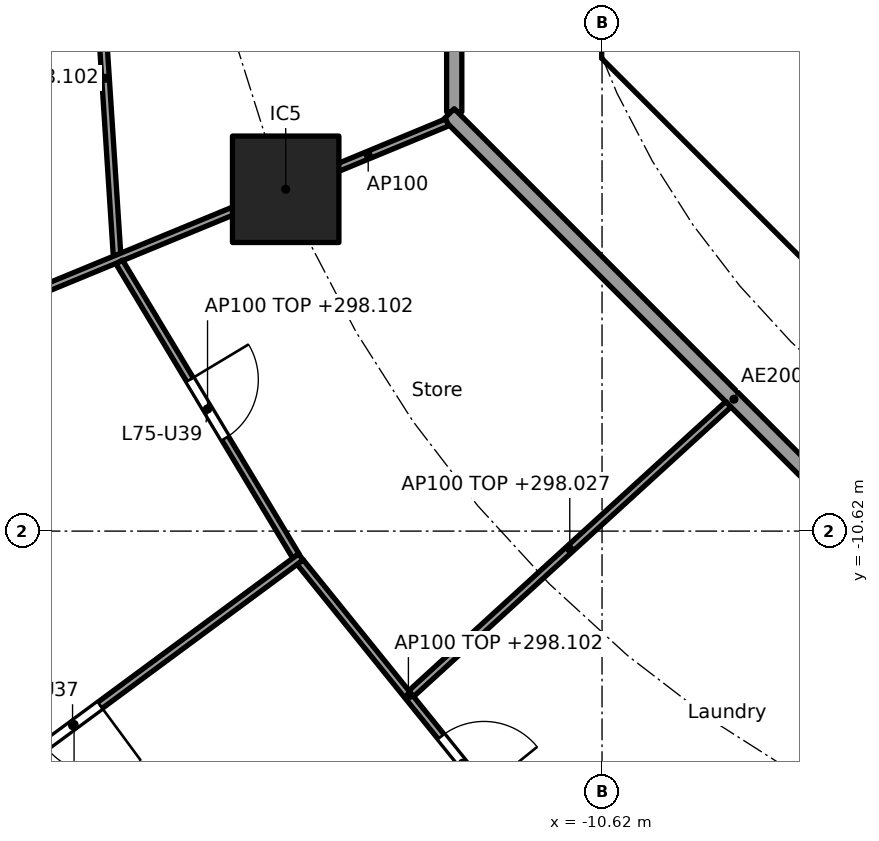
"""IFC4 building model, lengths in metres.
Left out: names, types, materials, properties, quantities, classifications, styles, units other than length and angle.
Written with IfcOpenShell. Run it as: python <this file> out.ifc"""

import sys

from ifc_helpers import new_model, si_unit, direction, frame, frame_2d, origin, origin_2d, place, context, subcontext, project, spatial, polyline, rectangle, outline, extrude, element, fill, save


model = new_model("IFC4")
c1 = context("Model", 3, precision=1e-05, world=origin(), true_north=direction((0.0, 1.0)))
c2 = subcontext(c1, "Body", "Model", "MODEL_VIEW")
j1 = project(units=[si_unit("LENGTHUNIT", "METRE"), si_unit("PLANEANGLEUNIT", "RADIAN")], contexts=[c1])
p1 = place(None, origin())
s1 = spatial("IfcSite", under=j1, at=p1, CompositionType="ELEMENT")
p2 = place(p1, origin())
s2 = spatial("IfcBuilding", under=s1, at=p2, CompositionType="ELEMENT")
p3 = place(p2, frame((0.0, 0.0, 295.5)))
s3 = spatial("IfcBuildingStorey", under=s2, at=p3, CompositionType="ELEMENT", Elevation=295.5)
p4 = place(p3, frame((-14.782, -6.123, 0.0), z_axis=(0.0, 0.0, 1.0), x_axis=(1.0, 0.0, 0.0)))
e1 = element("IfcColumn", 1, at=p4, inside=s3, PredefinedType="COLUMN", context=c2, shape_type="SweptSolid", body=[
    extrude(rectangle(XDim=1.4, YDim=1.4, at=origin_2d()), origin(), (0.0, 0.0, 1.0), 3.7),
])
p5 = place(p3, frame((-9.988, -4.613, 0.0), z_axis=(0.0, 0.0, 1.0), x_axis=(0.707106781187, -0.707106781187, 0.0)))
e2 = element("IfcWall", 2, at=p5, inside=s3, PredefinedType="SHEAR", context=c2, shape_type="SweptSolid", body=[
    extrude(rectangle(XDim=7.602, YDim=0.6, at=frame_2d((3.801, 0.0))), origin(), (0.0, 0.0, 1.0), 3.28),
])
p6 = place(p5, frame((6.151, 0.0, 0.0)))
e3 = element("IfcOpeningElement", 3, at=p6, cuts=e2, PredefinedType="OPENING", context=c2, shape_type="SweptSolid", body=[
    extrude(rectangle(XDim=1.1, YDim=2.1, at=frame_2d((0.55, 1.05))), frame((0.0, 0.31, 0.0), z_axis=(0.0, -1.0, 0.0), x_axis=(1.0, 0.0, 0.0)), (0.0, 0.0, 1.0), 0.62),
])
p7 = place(p3, origin())
e4 = element("IfcWall", 4, at=p7, inside=s3, PredefinedType="SHEAR", context=c2, shape_type="SweptSolid", body=[
    extrude(outline(polyline([(-10.625, -3.801), (-10.025, -3.801), (-10.025, -4.152), (-9.776, -4.401), (-10.2, -4.825), (-10.625, -4.401), (-10.625, -3.801)])), origin(), (0.0, 0.0, 1.0), 3.28),
])
p8 = place(p3, frame((-12.565, 5.304, 0.0), z_axis=(0.0, 0.0, 1.0), x_axis=(0.0, -1.0, 0.0)))
e5 = element("IfcWall", 5, at=p8, inside=s3, PredefinedType="PARTITIONING", context=c2, shape_type="SweptSolid", body=[
    extrude(rectangle(XDim=10.409, YDim=0.2, at=frame_2d((5.205, 0.0))), origin(), (0.0, 0.0, 1.0), 3.28),
])
p9 = place(p8, frame((4.804, 0.0, 0.0)))
e6 = element("IfcOpeningElement", 6, at=p9, cuts=e5, PredefinedType="OPENING", context=c2, shape_type="SweptSolid", body=[
    extrude(rectangle(XDim=1.0, YDim=2.1, at=frame_2d((0.5, 1.05))), frame((0.0, 0.11, 0.0), z_axis=(0.0, -1.0, 0.0), x_axis=(1.0, 0.0, 0.0)), (0.0, 0.0, 1.0), 0.22),
])
p10 = place(p3, frame((-12.635, -5.134, 0.0), z_axis=(0.0, 0.0, 1.0), x_axis=(0.707106781187, -0.707106781187, 0.0)))
e7 = element("IfcWall", 7, at=p10, inside=s3, PredefinedType="PARTITIONING", context=c2, shape_type="SweptSolid", body=[
    extrude(rectangle(XDim=10.609, YDim=0.2, at=frame_2d((5.305, 0.0))), origin(), (0.0, 0.0, 1.0), 3.28),
])
p11 = place(p3, frame((-17.304, -2.338, 0.0), z_axis=(0.0, 0.0, 1.0), x_axis=(0.064981578354, -0.99788646372, 0.0)))
e8 = element("IfcWall", 8, at=p11, inside=s3, PredefinedType="PARTITIONING", context=c2, shape_type="SweptSolid", body=[
    extrude(rectangle(XDim=4.659, YDim=0.1, at=frame_2d((2.329, 0.0))), origin(), (0.0, 0.0, 1.0), 2.602),
])
p12 = place(p3, frame((-12.657, -5.243, 0.0), z_axis=(0.0, 0.0, 1.0), x_axis=(-0.923871314276, -0.382703272338, 0.0)))
e9 = element("IfcWall", 9, at=p12, inside=s3, PredefinedType="PARTITIONING", context=c2, shape_type="SweptSolid", body=[
    extrude(rectangle(XDim=2.249, YDim=0.1, at=frame_2d((1.125, 0.0))), origin(), (0.0, 0.0, 1.0), 3.28),
])
p13 = place(p3, frame((-14.828, -6.142, 0.0), z_axis=(0.0, 0.0, 1.0), x_axis=(-0.924478087429, -0.381235184451, 0.0)))
e10 = element("IfcWall", 10, at=p13, inside=s3, PredefinedType="PARTITIONING", context=c2, shape_type="SweptSolid", body=[
    extrude(rectangle(XDim=8.499, YDim=0.1, at=frame_2d((4.25, 0.0))), origin(), (0.0, 0.0, 1.0), 2.602),
])
p14 = place(p13, frame((4.973, 0.0, 0.0)))
e11 = element("IfcOpeningElement", 11, at=p14, cuts=e10, PredefinedType="OPENING", context=c2, shape_type="SweptSolid", body=[
    extrude(rectangle(XDim=0.9, YDim=2.1, at=frame_2d((0.45, 1.05))), frame((0.0, 0.06, 0.0), z_axis=(0.0, -1.0, 0.0), x_axis=(1.0, 0.0, 0.0)), (0.0, 0.0, 1.0), 0.12),
])
p15 = place(p3, frame((-16.972, -7.08, 0.0), z_axis=(0.0, 0.0, 1.0), x_axis=(0.514989049311, -0.857196756346, 0.0)))
e12 = element("IfcWall", 12, at=p15, inside=s3, PredefinedType="PARTITIONING", context=c2, shape_type="SweptSolid", body=[
    extrude(rectangle(XDim=4.512, YDim=0.1, at=frame_2d((2.256, 0.0))), origin(), (0.0, 0.0, 1.0), 2.602),
])
p16 = place(p15, frame((1.806, 0.0, 0.0)))
e13 = element("IfcOpeningElement", 13, at=p16, cuts=e12, PredefinedType="OPENING", context=c2, shape_type="SweptSolid", body=[
    extrude(rectangle(XDim=0.9, YDim=2.1, at=frame_2d((0.45, 1.05))), frame((0.0, 0.06, 0.0), z_axis=(0.0, -1.0, 0.0), x_axis=(1.0, 0.0, 0.0)), (0.0, 0.0, 1.0), 0.12),
])
p17 = place(p3, frame((-14.582, -10.96, 0.0), z_axis=(0.0, 0.0, 1.0), x_axis=(-0.804405200554, -0.594081032623, 0.0)))
e14 = element("IfcWall", 14, at=p17, inside=s3, PredefinedType="PARTITIONING", context=c2, shape_type="SweptSolid", body=[
    extrude(rectangle(XDim=7.418, YDim=0.1, at=frame_2d((3.709, 0.0))), origin(), (0.0, 0.0, 1.0), 2.602),
])
p18 = place(p17, frame((3.284, 0.0, 0.0)))
e15 = element("IfcOpeningElement", 15, at=p18, cuts=e14, PredefinedType="OPENING", context=c2, shape_type="SweptSolid", body=[
    extrude(rectangle(XDim=0.9, YDim=2.1, at=frame_2d((0.45, 1.05))), frame((0.0, 0.06, 0.0), z_axis=(0.0, -1.0, 0.0), x_axis=(1.0, 0.0, 0.0)), (0.0, 0.0, 1.0), 0.12),
])
p19 = place(p3, frame((-14.591, -11.029, 0.0), z_axis=(0.0, 0.0, 1.0), x_axis=(0.628170338674, -0.778075848237, 0.0)))
e16 = element("IfcWall", 16, at=p19, inside=s3, PredefinedType="PARTITIONING", context=c2, shape_type="SweptSolid", body=[
    extrude(rectangle(XDim=4.532, YDim=0.1, at=frame_2d((2.266, 0.0))), origin(), (0.0, 0.0, 1.0), 2.602),
])
p20 = place(p19, frame((2.949, 0.0, 0.0)))
e17 = element("IfcOpeningElement", 17, at=p20, cuts=e16, PredefinedType="OPENING", context=c2, shape_type="SweptSolid", body=[
    extrude(rectangle(XDim=0.9, YDim=2.1, at=frame_2d((0.45, 1.05))), frame((0.0, 0.06, 0.0), z_axis=(0.0, -1.0, 0.0), x_axis=(1.0, 0.0, 0.0)), (0.0, 0.0, 1.0), 0.12),
])
p21 = place(p3, frame((-8.958, -8.952, 0.0), z_axis=(0.0, 0.0, 1.0), x_axis=(-0.73876526954, -0.673962815385, 0.0)))
e18 = element("IfcWall", 18, at=p21, inside=s3, PredefinedType="PARTITIONING", context=c2, shape_type="SweptSolid", body=[
    extrude(rectangle(XDim=5.647, YDim=0.1, at=frame_2d((2.824, 0.0))), origin(), (0.0, 0.0, 1.0), 2.527),
])
p22 = place(p18, origin())
e19 = element("IfcDoor", 19, at=p22, inside=s3, OperationType="SINGLE_SWING_LEFT", PredefinedType="DOOR", context=c2, shape_type="SweptSolid", body=[
    extrude(rectangle(XDim=0.9, YDim=2.1, at=frame_2d((0.45, 1.05))), frame((0.0, 0.025, 0.0), z_axis=(0.0, -1.0, 0.0), x_axis=(1.0, 0.0, 0.0)), (0.0, 0.0, 1.0), 0.05),
])
fill(e15, e19)
p23 = place(p16, origin())
e20 = element("IfcDoor", 20, at=p23, inside=s3, OperationType="SINGLE_SWING_LEFT", PredefinedType="DOOR", context=c2, shape_type="SweptSolid", body=[
    extrude(rectangle(XDim=0.9, YDim=2.1, at=frame_2d((0.45, 1.05))), frame((0.0, 0.025, 0.0), z_axis=(0.0, -1.0, 0.0), x_axis=(1.0, 0.0, 0.0)), (0.0, 0.0, 1.0), 0.05),
])
fill(e13, e20)
p24 = place(p20, origin())
e21 = element("IfcDoor", 21, at=p24, inside=s3, OperationType="SINGLE_SWING_RIGHT", PredefinedType="DOOR", context=c2, shape_type="SweptSolid", body=[
    extrude(rectangle(XDim=0.9, YDim=2.1, at=frame_2d((0.45, 1.05))), frame((0.0, 0.025, 0.0), z_axis=(0.0, -1.0, 0.0), x_axis=(1.0, 0.0, 0.0)), (0.0, 0.0, 1.0), 0.05),
])
fill(e17, e21)
save(model, sys.argv[1])
